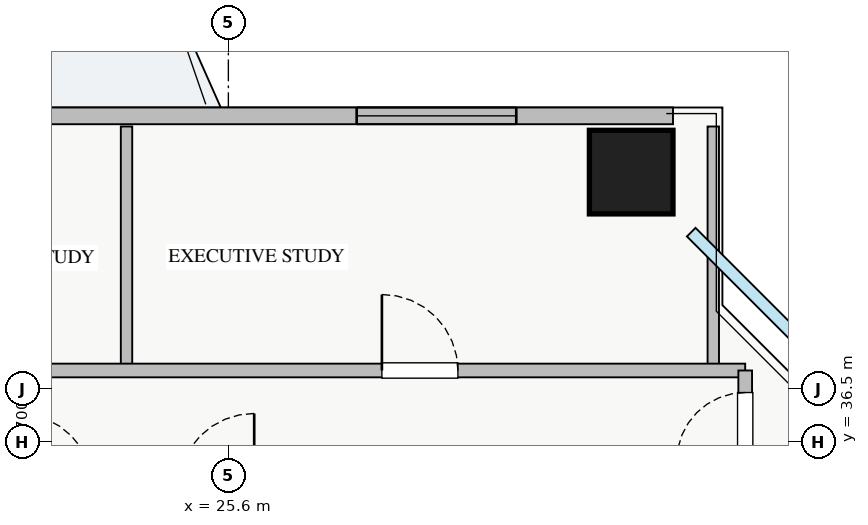
"""IFC4 building model, lengths in metres.
Left out: names, types, materials, properties, quantities, classifications, styles, units other than length and angle.
Written with IfcOpenShell. Run it as: python <this file> out.ifc"""

import sys

from ifc_helpers import new_model, si_unit, direction, frame, frame_2d, origin, origin_2d, place, context, subcontext, project, spatial, rectangle, extrude, source, transform, mapped, element, fill, save


model = new_model("IFC4")
c1 = context("Model", 3, precision=1e-05, world=origin(), true_north=direction((0.0, 1.0)))
c2 = subcontext(c1, "Body", "Model", "MODEL_VIEW")
j1 = project(units=[si_unit("LENGTHUNIT", "METRE"), si_unit("PLANEANGLEUNIT", "RADIAN")], contexts=[c1])
p1 = place(None, origin())
s1 = spatial("IfcSite", under=j1, at=p1, CompositionType="ELEMENT")
p2 = place(p1, origin())
s2 = spatial("IfcBuilding", under=s1, at=p2, CompositionType="ELEMENT")
p3 = place(p2, frame((0.0, 0.0, 136.0)))
s3 = spatial("IfcBuildingStorey", under=s2, at=p3, CompositionType="ELEMENT", Elevation=136.0)
m1 = source(origin(), c2, "Body", "SweptSolid", [
    extrude(rectangle(XDim=1.1, YDim=1.1, at=origin_2d()), origin(), (0.0, 0.0, 1.0), 3.25),
])
p4 = place(p3, frame((30.9, 40.05, 0.0), z_axis=(0.0, 0.0, 1.0), x_axis=(1.0, 0.0, 0.0)))
e1 = element("IfcColumn", 1, at=p4, inside=s3, PredefinedType="COLUMN", context=c2, shape_type="MappedRepresentation", body=[
    mapped(m1, transform((0.0, 0.0, 0.0), x_axis=(1.0, 0.0, 0.0), y_axis=(0.0, 1.0, 0.0), z_axis=(0.0, 0.0, 1.0), scale=1.0)),
])
p5 = place(p3, frame((6.55, 40.79, 0.0), z_axis=(0.0, 0.0, 1.0), x_axis=(1.0, 0.0, 0.0)))
e2 = element("IfcWall", 2, at=p5, inside=s3, PredefinedType="STANDARD", context=c2, shape_type="SweptSolid", body=[
    extrude(rectangle(XDim=24.9, YDim=0.22, at=frame_2d((12.45, 0.0))), origin(), (0.0, 0.0, 1.0), 2.57),
])
p6 = place(p5, frame((13.3, 0.0, 0.0)))
e3 = element("IfcOpeningElement", 3, at=p6, cuts=e2, PredefinedType="OPENING", context=c2, shape_type="SweptSolid", body=[
    extrude(rectangle(XDim=1.2, YDim=2.1, at=frame_2d((0.6, 1.05))), frame((0.0, 0.12, 0.0), z_axis=(0.0, -1.0, 0.0), x_axis=(1.0, 0.0, 0.0)), (0.0, 0.0, 1.0), 0.24),
])
p7 = place(p5, frame((0.393, 0.0, 0.9)))
e4 = element("IfcOpeningElement", 4, at=p7, cuts=e2, PredefinedType="OPENING", context=c2, shape_type="SweptSolid", body=[
    extrude(rectangle(XDim=1.5, YDim=1.5, at=frame_2d((0.75, 0.75))), frame((0.0, 0.12, 0.0), z_axis=(0.0, -1.0, 0.0), x_axis=(1.0, 0.0, 0.0)), (0.0, 0.0, 1.0), 0.24),
])
p8 = place(p5, frame((7.088, 0.0, 0.9)))
e5 = element("IfcOpeningElement", 5, at=p8, cuts=e2, PredefinedType="OPENING", context=c2, shape_type="SweptSolid", body=[
    extrude(rectangle(XDim=1.8, YDim=1.5, at=frame_2d((0.9, 0.75))), frame((0.0, 0.12, 0.0), z_axis=(0.0, -1.0, 0.0), x_axis=(1.0, 0.0, 0.0)), (0.0, 0.0, 1.0), 0.24),
])
p9 = place(p5, frame((14.813, 0.0, 0.9)))
e6 = element("IfcOpeningElement", 6, at=p9, cuts=e2, PredefinedType="OPENING", context=c2, shape_type="SweptSolid", body=[
    extrude(rectangle(XDim=1.5, YDim=1.45, at=frame_2d((0.75, 0.725))), frame((0.0, 0.12, 0.0), z_axis=(0.0, -1.0, 0.0), x_axis=(1.0, 0.0, 0.0)), (0.0, 0.0, 1.0), 0.24),
])
p10 = place(p5, frame((20.738, 0.0, 0.9)))
e7 = element("IfcOpeningElement", 7, at=p10, cuts=e2, PredefinedType="OPENING", context=c2, shape_type="SweptSolid", body=[
    extrude(rectangle(XDim=2.1, YDim=1.48, at=frame_2d((1.05, 0.74))), frame((0.0, 0.12, 0.0), z_axis=(0.0, -1.0, 0.0), x_axis=(1.0, 0.0, 0.0)), (0.0, 0.0, 1.0), 0.24),
])
p11 = place(p5, frame((4.171, 0.0, 0.9)))
e8 = element("IfcOpeningElement", 8, at=p11, cuts=e2, PredefinedType="OPENING", context=c2, shape_type="SweptSolid", body=[
    extrude(rectangle(XDim=2.4, YDim=1.5, at=frame_2d((1.2, 0.75))), frame((0.0, 0.12, 0.0), z_axis=(0.0, -1.0, 0.0), x_axis=(1.0, 0.0, 0.0)), (0.0, 0.0, 1.0), 0.24),
])
p12 = place(p5, frame((10.177, 0.0, 0.9)))
e9 = element("IfcOpeningElement", 9, at=p12, cuts=e2, PredefinedType="OPENING", context=c2, shape_type="SweptSolid", body=[
    extrude(rectangle(XDim=2.4, YDim=1.5, at=frame_2d((1.2, 0.75))), frame((0.0, 0.12, 0.0), z_axis=(0.0, -1.0, 0.0), x_axis=(1.0, 0.0, 0.0)), (0.0, 0.0, 1.0), 0.24),
])
for number, where, z_axis, x_axis in (
    (10, (24.26, 37.44, 0.0), (0.0, 0.0, 1.0), (0.0, 1.0, 0.0)),
    (11, (31.98, 37.44, 0.0), (0.0, 0.0, 1.0), (0.0, 1.0, 0.0)),
):
    element("IfcWall", number, at=place(p3, frame(where, z_axis=z_axis, x_axis=x_axis)), inside=s3, PredefinedType="PARTITIONING", context=c2, shape_type="SweptSolid", body=[
        extrude(rectangle(XDim=3.21, YDim=0.15, at=frame_2d((1.605, 0.0))), origin(), (0.0, 0.0, 1.0), 3.03),
    ])
p13 = place(p3, frame((8.82, 37.44, 0.0), z_axis=(0.0, 0.0, 1.0), x_axis=(1.0, 0.0, 0.0)))
e12 = element("IfcWall", 12, at=p13, inside=s3, PredefinedType="PARTITIONING", context=c2, shape_type="SweptSolid", body=[
    extrude(rectangle(XDim=23.58, YDim=0.18, at=frame_2d((11.79, 0.0))), origin(), (0.0, 0.0, 1.0), 3.03),
])
p14 = place(p13, frame((3.085, 0.0, 0.0)))
e13 = element("IfcOpeningElement", 13, at=p14, cuts=e12, PredefinedType="OPENING", context=c2, shape_type="SweptSolid", body=[
    extrude(rectangle(XDim=1.0, YDim=2.05, at=frame_2d((0.5, 1.025))), frame((0.0, 0.1, 0.0), z_axis=(0.0, -1.0, 0.0), x_axis=(1.0, 0.0, 0.0)), (0.0, 0.0, 1.0), 0.2),
])
p15 = place(p13, frame((10.805, 0.0, 0.0)))
e14 = element("IfcOpeningElement", 14, at=p15, cuts=e12, PredefinedType="OPENING", context=c2, shape_type="SweptSolid", body=[
    extrude(rectangle(XDim=1.0, YDim=2.05, at=frame_2d((0.5, 1.025))), frame((0.0, 0.1, 0.0), z_axis=(0.0, -1.0, 0.0), x_axis=(1.0, 0.0, 0.0)), (0.0, 0.0, 1.0), 0.2),
])
p16 = place(p13, frame((18.8, 0.0, 0.0)))
e15 = element("IfcOpeningElement", 15, at=p16, cuts=e12, PredefinedType="OPENING", context=c2, shape_type="SweptSolid", body=[
    extrude(rectangle(XDim=1.0, YDim=2.05, at=frame_2d((0.5, 1.025))), frame((0.0, 0.1, 0.0), z_axis=(0.0, -1.0, 0.0), x_axis=(1.0, 0.0, 0.0)), (0.0, 0.0, 1.0), 0.2),
])
p17 = place(p3, frame((32.4, 8.31, 0.0), z_axis=(0.0, 0.0, 1.0), x_axis=(0.0, 1.0, 0.0)))
e16 = element("IfcWall", 16, at=p17, inside=s3, PredefinedType="PARTITIONING", context=c2, shape_type="SweptSolid", body=[
    extrude(rectangle(XDim=29.13, YDim=0.18, at=frame_2d((14.565, 0.0))), origin(), (0.0, 0.0, 1.0), 3.03),
])
p18 = place(p17, frame((27.94, 0.0, 0.0)))
e17 = element("IfcOpeningElement", 17, at=p18, cuts=e16, PredefinedType="OPENING", context=c2, shape_type="SweptSolid", body=[
    extrude(rectangle(XDim=0.9, YDim=2.05, at=frame_2d((0.45, 1.025))), frame((0.0, 0.1, 0.0), z_axis=(0.0, -1.0, 0.0), x_axis=(1.0, 0.0, 0.0)), (0.0, 0.0, 1.0), 0.2),
])
p19 = place(p17, frame((0.415, 0.0, 0.0)))
e18 = element("IfcOpeningElement", 18, at=p19, cuts=e16, PredefinedType="OPENING", context=c2, shape_type="SweptSolid", body=[
    extrude(rectangle(XDim=0.9, YDim=2.05, at=frame_2d((0.45, 1.025))), frame((0.0, 0.1, 0.0), z_axis=(0.0, -1.0, 0.0), x_axis=(1.0, 0.0, 0.0)), (0.0, 0.0, 1.0), 0.2),
])
p20 = place(p17, frame((4.75, 0.0, 0.0)))
e19 = element("IfcOpeningElement", 19, at=p20, cuts=e16, PredefinedType="OPENING", context=c2, shape_type="SweptSolid", body=[
    extrude(rectangle(XDim=1.0, YDim=2.05, at=frame_2d((0.5, 1.025))), frame((0.0, 0.1, 0.0), z_axis=(0.0, -1.0, 0.0), x_axis=(1.0, 0.0, 0.0)), (0.0, 0.0, 1.0), 0.2),
])
p21 = place(p17, frame((18.11, 0.0, 0.0)))
e20 = element("IfcOpeningElement", 20, at=p21, cuts=e16, PredefinedType="OPENING", context=c2, shape_type="SweptSolid", body=[
    extrude(rectangle(XDim=1.0, YDim=2.05, at=frame_2d((0.5, 1.025))), frame((0.0, 0.1, 0.0), z_axis=(0.0, -1.0, 0.0), x_axis=(1.0, 0.0, 0.0)), (0.0, 0.0, 1.0), 0.2),
])
m2 = source(origin(), c2, "Body", "SweptSolid", [
    extrude(rectangle(XDim=2.1, YDim=1.48, at=frame_2d((1.05, 0.74))), frame((0.0, 0.03, 0.0), z_axis=(0.0, -1.0, 0.0), x_axis=(1.0, 0.0, 0.0)), (0.0, 0.0, 1.0), 0.06),
])
p22 = place(p10, origin())
e21 = element("IfcWindow", 21, at=p22, inside=s3, PartitioningType="TRIPLE_PANEL_VERTICAL", PredefinedType="WINDOW", context=c2, shape_type="MappedRepresentation", body=[
    mapped(m2, transform((0.0, 0.0, 0.0), x_axis=(1.0, 0.0, 0.0), y_axis=(0.0, 1.0, 0.0), z_axis=(0.0, 0.0, 1.0), scale=1.0)),
])
fill(e7, e21)
m3 = source(origin(), c2, "Body", "SweptSolid", [
    extrude(rectangle(XDim=1.0, YDim=2.05, at=frame_2d((0.5, 1.025))), frame((0.0, 0.025, 0.0), z_axis=(0.0, -1.0, 0.0), x_axis=(1.0, 0.0, 0.0)), (0.0, 0.0, 1.0), 0.05),
])
p23 = place(p16, origin())
e22 = element("IfcDoor", 22, at=p23, inside=s3, OperationType="SINGLE_SWING_LEFT", PredefinedType="DOOR", context=c2, shape_type="MappedRepresentation", body=[
    mapped(m3, transform((0.0, 0.0, 0.0), x_axis=(1.0, 0.0, 0.0), y_axis=(0.0, 1.0, 0.0), z_axis=(0.0, 0.0, 1.0), scale=1.0)),
])
fill(e15, e22)
m4 = source(origin(), c2, "Body", "SweptSolid", [
    extrude(rectangle(XDim=0.9, YDim=2.05, at=frame_2d((0.45, 1.025))), frame((0.0, 0.025, 0.0), z_axis=(0.0, -1.0, 0.0), x_axis=(1.0, 0.0, 0.0)), (0.0, 0.0, 1.0), 0.05),
])
p24 = place(p18, origin())
e23 = element("IfcDoor", 23, at=p24, inside=s3, OperationType="SINGLE_SWING_LEFT", PredefinedType="DOOR", context=c2, shape_type="MappedRepresentation", body=[
    mapped(m4, transform((0.0, 0.0, 0.0), x_axis=(1.0, 0.0, 0.0), y_axis=(0.0, 1.0, 0.0), z_axis=(0.0, 0.0, 1.0), scale=1.0)),
])
fill(e17, e23)
save(model, sys.argv[1])
